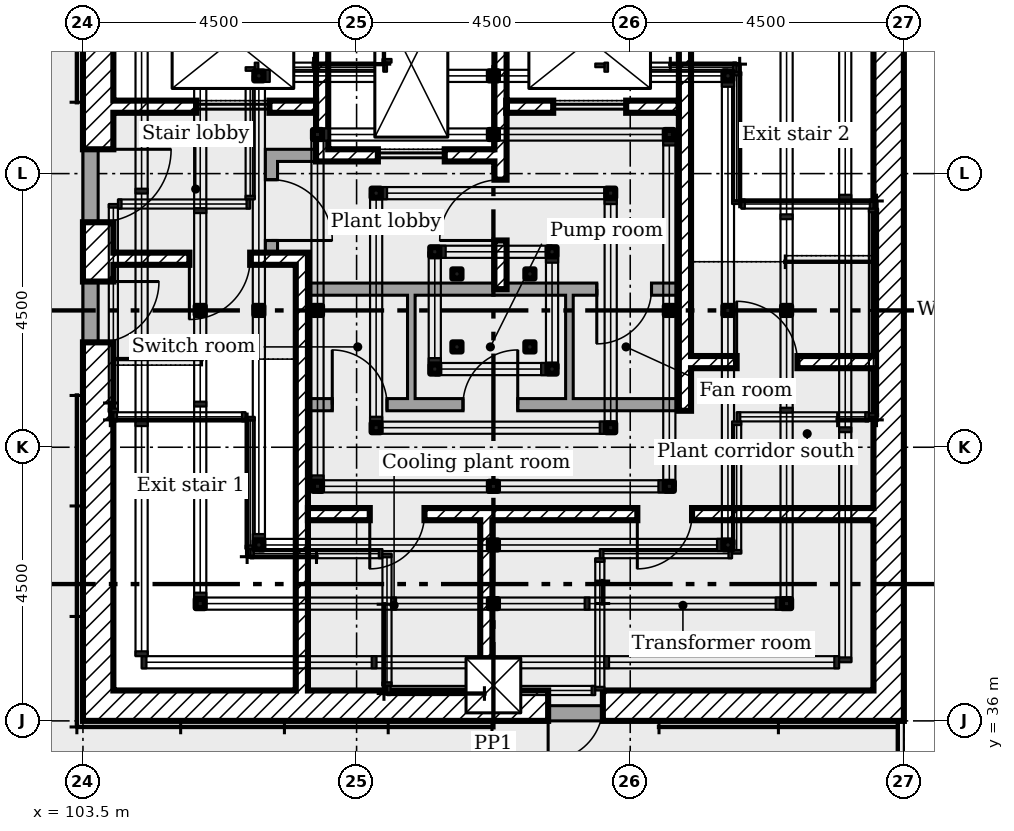
"""IFC4 building model, lengths in metres.
Left out: names, types, materials, properties, quantities, classifications, styles, units other than length and angle.
Written with IfcOpenShell. Run it as: python <this file> out.ifc"""

import sys

from ifc_helpers import new_model, si_unit, direction, frame, frame_2d, origin, origin_2d, place, context, subcontext, project, spatial, rectangle, hollow_rectangle, extrude, element, fill, save


model = new_model("IFC4")
c1 = context("Model", 3, precision=1e-05, world=origin(), true_north=direction((0.0, 1.0)))
c2 = subcontext(c1, "Body", "Model", "MODEL_VIEW")
j1 = project(units=[si_unit("LENGTHUNIT", "METRE"), si_unit("PLANEANGLEUNIT", "RADIAN")], contexts=[c1])
p1 = place(None, origin())
s1 = spatial("IfcSite", under=j1, at=p1, CompositionType="ELEMENT")
p2 = place(p1, origin())
s2 = spatial("IfcBuilding", under=s1, at=p2, CompositionType="ELEMENT")
p3 = place(p2, frame((0.0, 0.0, 210.0)))
s3 = spatial("IfcBuildingStorey", under=s2, at=p3, CompositionType="ELEMENT", Elevation=210.0)
p4 = place(p3, frame((103.5, 36.125, 3.6)))
e1 = element("IfcWall", 1, at=p4, inside=s3, PredefinedType="PARAPET", context=c2, shape_type="SweptSolid", body=[
    extrude(rectangle(XDim=13.5, YDim=0.25, at=frame_2d((6.75, 0.0))), origin(), (0.0, 0.0, 1.0), 1.1),
])
p5 = place(p3, frame((116.875, 36.25, 3.6), z_axis=(0.0, 0.0, 1.0), x_axis=(0.0, 1.0, 0.0)))
e2 = element("IfcWall", 2, at=p5, inside=s3, PredefinedType="PARAPET", context=c2, shape_type="SweptSolid", body=[
    extrude(rectangle(XDim=13.25, YDim=0.25, at=frame_2d((6.625, 0.0))), origin(), (0.0, 0.0, 1.0), 1.1),
])
p6 = place(p3, frame((103.625, 49.25, 3.6), z_axis=(0.0, 0.0, 1.0), x_axis=(0.0, -1.0, 0.0)))
e3 = element("IfcWall", 3, at=p6, inside=s3, PredefinedType="PARAPET", context=c2, shape_type="SweptSolid", body=[
    extrude(rectangle(XDim=13.0, YDim=0.25, at=frame_2d((6.5, 0.0))), origin(), (0.0, 0.0, 1.0), 1.1),
])
for number, where in (
    (4, (105.428, 37.928, 3.6)),
    (5, (110.25, 37.928, 3.6)),
    (6, (115.072, 37.928, 3.6)),
    (7, (115.072, 42.75, 3.6)),
    (8, (105.428, 42.75, 3.6)),
):
    element("IfcColumn", number, at=place(p3, frame(where)), inside=s3, PredefinedType="COLUMN", context=c2, shape_type="SweptSolid", body=[
        extrude(hollow_rectangle(XDim=0.15, YDim=0.15, WallThickness=0.008, at=origin_2d()), origin(), (0.0, 0.0, 1.0), 1.84),
    ])
for number, where in (
    (9, (106.393, 38.893, 3.6)),
    (10, (110.25, 38.893, 3.6)),
    (11, (114.107, 38.893, 3.6)),
    (12, (114.107, 42.75, 3.6)),
    (13, (114.107, 46.607, 3.6)),
    (14, (110.25, 46.607, 3.6)),
    (15, (106.393, 46.607, 3.6)),
    (16, (106.393, 42.75, 3.6)),
):
    element("IfcColumn", number, at=place(p3, frame(where)), inside=s3, PredefinedType="COLUMN", context=c2, shape_type="SweptSolid", body=[
        extrude(hollow_rectangle(XDim=0.15, YDim=0.15, WallThickness=0.008, at=origin_2d()), origin(), (0.0, 0.0, 1.0), 3.99),
    ])
for number, where in (
    (17, (107.357, 39.857, 3.6)),
    (18, (110.25, 39.857, 3.6)),
    (19, (113.143, 39.857, 3.6)),
    (20, (113.143, 42.75, 3.6)),
    (21, (113.143, 45.643, 3.6)),
    (22, (110.25, 45.643, 3.6)),
    (23, (107.357, 45.643, 3.6)),
    (24, (107.357, 42.75, 3.6)),
):
    element("IfcColumn", number, at=place(p3, frame(where)), inside=s3, PredefinedType="COLUMN", context=c2, shape_type="SweptSolid", body=[
        extrude(hollow_rectangle(XDim=0.15, YDim=0.15, WallThickness=0.008, at=origin_2d()), origin(), (0.0, 0.0, 1.0), 6.18),
    ])
for number, where in (
    (25, (108.322, 40.822, 3.6)),
    (26, (112.178, 40.822, 3.6)),
    (27, (112.178, 44.678, 3.6)),
    (28, (108.322, 44.678, 3.6)),
):
    element("IfcColumn", number, at=place(p3, frame(where)), inside=s3, PredefinedType="COLUMN", context=c2, shape_type="SweptSolid", body=[
        extrude(hollow_rectangle(XDim=0.15, YDim=0.15, WallThickness=0.008, at=origin_2d()), origin(), (0.0, 0.0, 1.0), 8.29),
    ])
for number, where in (
    (29, (109.286, 41.786, 3.6)),
    (30, (111.214, 41.786, 3.6)),
    (31, (111.214, 43.714, 3.6)),
    (32, (109.286, 43.714, 3.6)),
):
    element("IfcColumn", number, at=place(p3, frame(where)), inside=s3, PredefinedType="COLUMN", context=c2, shape_type="SweptSolid", body=[
        extrude(hollow_rectangle(XDim=0.15, YDim=0.15, WallThickness=0.008, at=origin_2d()), origin(), (0.0, 0.0, 1.0), 10.48),
    ])
for number, where in (
    (33, (109.65, 42.15, 3.6)),
    (34, (110.85, 42.15, 3.6)),
    (35, (110.85, 43.35, 3.6)),
    (36, (109.65, 43.35, 3.6)),
):
    element("IfcColumn", number, at=place(p3, frame(where)), inside=s3, PredefinedType="COLUMN", context=c2, shape_type="SweptSolid", body=[
        extrude(hollow_rectangle(XDim=0.15, YDim=0.15, WallThickness=0.008, at=origin_2d()), origin(), (0.0, 0.0, 1.0), 12.63),
    ])
p7 = place(p3, frame((116.75, 36.0, 0.0), z_axis=(0.0, 0.0, 1.0), x_axis=(0.0, 1.0, 0.0)))
e37 = element("IfcWall", 37, at=p7, inside=s3, PredefinedType="SHEAR", context=c2, shape_type="SweptSolid", body=[
    extrude(rectangle(XDim=13.5, YDim=0.5, at=frame_2d((6.75, 0.0))), origin(), (0.0, 0.0, 1.0), 3.2),
])
p8 = place(p3, frame((103.5, 36.25, 0.0)))
e38 = element("IfcWall", 38, at=p8, inside=s3, PredefinedType="SHEAR", context=c2, shape_type="SweptSolid", body=[
    extrude(rectangle(XDim=13.0, YDim=0.5, at=frame_2d((6.5, 0.0))), origin(), (0.0, 0.0, 1.0), 3.2),
])
p9 = place(p8, frame((7.65, 0.0, 0.0)))
e39 = element("IfcOpeningElement", 39, at=p9, cuts=e38, PredefinedType="OPENING", context=c2, shape_type="SweptSolid", body=[
    extrude(rectangle(XDim=0.9, YDim=2.1, at=frame_2d((0.45, 1.05))), frame((0.0, 0.26, 0.0), z_axis=(0.0, -1.0, 0.0), x_axis=(1.0, 0.0, 0.0)), (0.0, 0.0, 1.0), 0.52),
])
p10 = place(p3, frame((103.75, 36.5, 0.0), z_axis=(0.0, 0.0, 1.0), x_axis=(0.0, 1.0, 0.0)))
e40 = element("IfcWall", 40, at=p10, inside=s3, PredefinedType="SHEAR", context=c2, shape_type="SweptSolid", body=[
    extrude(rectangle(XDim=12.5, YDim=0.5, at=frame_2d((6.25, 0.0))), origin(), (0.0, 0.0, 1.0), 3.2),
])
p11 = place(p10, frame((7.7, 0.0, 0.0)))
e41 = element("IfcOpeningElement", 41, at=p11, cuts=e40, PredefinedType="OPENING", context=c2, shape_type="SweptSolid", body=[
    extrude(rectangle(XDim=1.2, YDim=2.1, at=frame_2d((0.6, 1.05))), frame((0.0, 0.26, 0.0), z_axis=(0.0, -1.0, 0.0), x_axis=(1.0, 0.0, 0.0)), (0.0, 0.0, 1.0), 0.52),
])
p12 = place(p10, frame((5.725, 0.0, 0.0)))
e42 = element("IfcOpeningElement", 42, at=p12, cuts=e40, PredefinedType="OPENING", context=c2, shape_type="SweptSolid", body=[
    extrude(rectangle(XDim=1.0, YDim=2.1, at=frame_2d((0.5, 1.05))), frame((0.0, 0.26, 0.0), z_axis=(0.0, -1.0, 0.0), x_axis=(1.0, 0.0, 0.0)), (0.0, 0.0, 1.0), 0.52),
])
p13 = place(p3, frame((107.433, 49.0, 0.0), z_axis=(0.0, 0.0, 1.0), x_axis=(0.0, -1.0, 0.0)))
e43 = element("IfcWall", 43, at=p13, inside=s3, PredefinedType="SHEAR", context=c2, shape_type="SweptSolid", body=[
    extrude(rectangle(XDim=3.8, YDim=0.2, at=frame_2d((1.9, 0.0))), origin(), (0.0, 0.0, 1.0), 3.2),
])
p14 = place(p3, frame((110.367, 49.0, 0.0), z_axis=(0.0, 0.0, 1.0), x_axis=(0.0, -1.0, 0.0)))
e44 = element("IfcWall", 44, at=p14, inside=s3, PredefinedType="SHEAR", context=c2, shape_type="SweptSolid", body=[
    extrude(rectangle(XDim=5.9, YDim=0.2, at=frame_2d((2.95, 0.0))), origin(), (0.0, 0.0, 1.0), 3.2),
])
p15 = place(p14, frame((4.1, 0.0, 0.0)))
e45 = element("IfcOpeningElement", 45, at=p15, cuts=e44, PredefinedType="OPENING", context=c2, shape_type="SweptSolid", body=[
    extrude(rectangle(XDim=1.0, YDim=2.1, at=frame_2d((0.5, 1.05))), frame((0.0, 0.11, 0.0), z_axis=(0.0, -1.0, 0.0), x_axis=(1.0, 0.0, 0.0)), (0.0, 0.0, 1.0), 0.22),
])
p16 = place(p3, frame((110.133, 36.5, 0.0), z_axis=(0.0, 0.0, 1.0), x_axis=(0.0, 1.0, 0.0)))
e46 = element("IfcWall", 46, at=p16, inside=s3, PredefinedType="SHEAR", context=c2, shape_type="SweptSolid", body=[
    extrude(rectangle(XDim=2.8, YDim=0.2, at=frame_2d((1.4, 0.0))), origin(), (0.0, 0.0, 1.0), 3.2),
])
p17 = place(p3, frame((106.5, 45.3, 0.0)))
e47 = element("IfcWall", 47, at=p17, inside=s3, PredefinedType="PARTITIONING", context=c2, shape_type="SweptSolid", body=[
    extrude(rectangle(XDim=0.833, YDim=0.2, at=frame_2d((0.417, 0.0))), origin(), (0.0, 0.0, 1.0), 3.2),
])
p18 = place(p3, frame((106.6, 43.7, 0.0), z_axis=(0.0, 0.0, 1.0), x_axis=(0.0, 1.0, 0.0)))
e48 = element("IfcWall", 48, at=p18, inside=s3, PredefinedType="PARTITIONING", context=c2, shape_type="SweptSolid", body=[
    extrude(rectangle(XDim=1.5, YDim=0.2, at=frame_2d((0.75, 0.0))), origin(), (0.0, 0.0, 1.0), 3.2),
])
p19 = place(p18, frame((0.2, 0.0, 0.0)))
e49 = element("IfcOpeningElement", 49, at=p19, cuts=e48, PredefinedType="OPENING", context=c2, shape_type="SweptSolid", body=[
    extrude(rectangle(XDim=1.0, YDim=2.1, at=frame_2d((0.5, 1.05))), frame((0.0, 0.11, 0.0), z_axis=(0.0, -1.0, 0.0), x_axis=(1.0, 0.0, 0.0)), (0.0, 0.0, 1.0), 0.22),
])
p20 = place(p3, frame((104.0, 46.1, 0.0)))
e50 = element("IfcWall", 50, at=p20, inside=s3, PredefinedType="SHEAR", context=c2, shape_type="SweptSolid", body=[
    extrude(rectangle(XDim=3.333, YDim=0.2, at=frame_2d((1.667, 0.0))), origin(), (0.0, 0.0, 1.0), 3.2),
])
p21 = place(p20, frame((1.367, 0.0, 0.0)))
e51 = element("IfcOpeningElement", 51, at=p21, cuts=e50, PredefinedType="OPENING", context=c2, shape_type="SweptSolid", body=[
    extrude(rectangle(XDim=1.2, YDim=2.1, at=frame_2d((0.6, 1.05))), frame((0.0, 0.11, 0.0), z_axis=(0.0, -1.0, 0.0), x_axis=(1.0, 0.0, 0.0)), (0.0, 0.0, 1.0), 0.22),
])
p22 = place(p3, frame((110.467, 46.1, 0.0)))
e52 = element("IfcWall", 52, at=p22, inside=s3, PredefinedType="SHEAR", context=c2, shape_type="SweptSolid", body=[
    extrude(rectangle(XDim=2.833, YDim=0.2, at=frame_2d((1.417, 0.0))), origin(), (0.0, 0.0, 1.0), 3.2),
])
p23 = place(p22, frame((0.767, 0.0, 0.0)))
e53 = element("IfcOpeningElement", 53, at=p23, cuts=e52, PredefinedType="OPENING", context=c2, shape_type="SweptSolid", body=[
    extrude(rectangle(XDim=1.2, YDim=2.1, at=frame_2d((0.6, 1.05))), frame((0.0, 0.11, 0.0), z_axis=(0.0, -1.0, 0.0), x_axis=(1.0, 0.0, 0.0)), (0.0, 0.0, 1.0), 0.22),
])
p24 = place(p3, frame((107.533, 45.3, 0.0)))
e54 = element("IfcWall", 54, at=p24, inside=s3, PredefinedType="SHEAR", context=c2, shape_type="SweptSolid", body=[
    extrude(rectangle(XDim=2.733, YDim=0.2, at=frame_2d((1.367, 0.0))), origin(), (0.0, 0.0, 1.0), 3.2),
])
p25 = place(p24, frame((0.817, 0.0, 0.0)))
e55 = element("IfcOpeningElement", 55, at=p25, cuts=e54, PredefinedType="OPENING", context=c2, shape_type="SweptSolid", body=[
    extrude(rectangle(XDim=1.1, YDim=2.1, at=frame_2d((0.55, 1.05))), frame((0.0, 0.11, 0.0), z_axis=(0.0, -1.0, 0.0), x_axis=(1.0, 0.0, 0.0)), (0.0, 0.0, 1.0), 0.22),
])
p26 = place(p3, frame((107.2, 39.4, 0.0)))
e56 = element("IfcWall", 56, at=p26, inside=s3, PredefinedType="SHEAR", context=c2, shape_type="SweptSolid", body=[
    extrude(rectangle(XDim=9.3, YDim=0.2, at=frame_2d((4.65, 0.0))), origin(), (0.0, 0.0, 1.0), 3.2),
])
p27 = place(p26, frame((1.017, 0.0, 0.0)))
e57 = element("IfcOpeningElement", 57, at=p27, cuts=e56, PredefinedType="OPENING", context=c2, shape_type="SweptSolid", body=[
    extrude(rectangle(XDim=0.9, YDim=2.1, at=frame_2d((0.45, 1.05))), frame((0.0, 0.11, 0.0), z_axis=(0.0, -1.0, 0.0), x_axis=(1.0, 0.0, 0.0)), (0.0, 0.0, 1.0), 0.22),
])
p28 = place(p26, frame((5.417, 0.0, 0.0)))
e58 = element("IfcOpeningElement", 58, at=p28, cuts=e56, PredefinedType="OPENING", context=c2, shape_type="SweptSolid", body=[
    extrude(rectangle(XDim=0.9, YDim=2.1, at=frame_2d((0.45, 1.05))), frame((0.0, 0.11, 0.0), z_axis=(0.0, -1.0, 0.0), x_axis=(1.0, 0.0, 0.0)), (0.0, 0.0, 1.0), 0.22),
])
p29 = place(p3, frame((107.1, 36.5, 0.0), z_axis=(0.0, 0.0, 1.0), x_axis=(0.0, 1.0, 0.0)))
e59 = element("IfcWall", 59, at=p29, inside=s3, PredefinedType="SHEAR", context=c2, shape_type="SweptSolid", body=[
    extrude(rectangle(XDim=7.2, YDim=0.2, at=frame_2d((3.6, 0.0))), origin(), (0.0, 0.0, 1.0), 3.2),
])
p30 = place(p3, frame((104.0, 43.6, 0.0)))
e60 = element("IfcWall", 60, at=p30, inside=s3, PredefinedType="SHEAR", context=c2, shape_type="SweptSolid", body=[
    extrude(rectangle(XDim=3.0, YDim=0.2, at=frame_2d((1.5, 0.0))), origin(), (0.0, 0.0, 1.0), 3.2),
])
p31 = place(p30, frame((1.25, 0.0, 0.0)))
e61 = element("IfcOpeningElement", 61, at=p31, cuts=e60, PredefinedType="OPENING", context=c2, shape_type="SweptSolid", body=[
    extrude(rectangle(XDim=1.0, YDim=2.1, at=frame_2d((0.5, 1.05))), frame((0.0, 0.11, 0.0), z_axis=(0.0, -1.0, 0.0), x_axis=(1.0, 0.0, 0.0)), (0.0, 0.0, 1.0), 0.22),
])
p32 = place(p3, frame((113.5, 41.9, 0.0)))
e62 = element("IfcWall", 62, at=p32, inside=s3, PredefinedType="SHEAR", context=c2, shape_type="SweptSolid", body=[
    extrude(rectangle(XDim=3.0, YDim=0.2, at=frame_2d((1.5, 0.0))), origin(), (0.0, 0.0, 1.0), 3.2),
])
p33 = place(p32, frame((0.75, 0.0, 0.0)))
e63 = element("IfcOpeningElement", 63, at=p33, cuts=e62, PredefinedType="OPENING", context=c2, shape_type="SweptSolid", body=[
    extrude(rectangle(XDim=1.0, YDim=2.1, at=frame_2d((0.5, 1.05))), frame((0.0, 0.11, 0.0), z_axis=(0.0, -1.0, 0.0), x_axis=(1.0, 0.0, 0.0)), (0.0, 0.0, 1.0), 0.22),
])
p34 = place(p3, frame((113.4, 41.1, 0.0), z_axis=(0.0, 0.0, 1.0), x_axis=(0.0, 1.0, 0.0)))
e64 = element("IfcWall", 64, at=p34, inside=s3, PredefinedType="SHEAR", context=c2, shape_type="SweptSolid", body=[
    extrude(rectangle(XDim=7.9, YDim=0.2, at=frame_2d((3.95, 0.0))), origin(), (0.0, 0.0, 1.0), 3.2),
])
p35 = place(p3, frame((107.2, 43.1, 0.0)))
e65 = element("IfcWall", 65, at=p35, inside=s3, PredefinedType="PARTITIONING", context=c2, shape_type="SweptSolid", body=[
    extrude(rectangle(XDim=6.1, YDim=0.2, at=frame_2d((3.05, 0.0))), origin(), (0.0, 0.0, 1.0), 3.2),
])
p36 = place(p35, frame((4.75, 0.0, 0.0)))
e66 = element("IfcOpeningElement", 66, at=p36, cuts=e65, PredefinedType="OPENING", context=c2, shape_type="SweptSolid", body=[
    extrude(rectangle(XDim=0.9, YDim=2.1, at=frame_2d((0.45, 1.05))), frame((0.0, 0.11, 0.0), z_axis=(0.0, -1.0, 0.0), x_axis=(1.0, 0.0, 0.0)), (0.0, 0.0, 1.0), 0.22),
])
p37 = place(p3, frame((107.2, 41.2, 0.0)))
e67 = element("IfcWall", 67, at=p37, inside=s3, PredefinedType="PARTITIONING", context=c2, shape_type="SweptSolid", body=[
    extrude(rectangle(XDim=6.1, YDim=0.2, at=frame_2d((3.05, 0.0))), origin(), (0.0, 0.0, 1.0), 3.2),
])
p38 = place(p37, frame((0.4, 0.0, 0.0)))
e68 = element("IfcOpeningElement", 68, at=p38, cuts=e67, PredefinedType="OPENING", context=c2, shape_type="SweptSolid", body=[
    extrude(rectangle(XDim=0.9, YDim=2.1, at=frame_2d((0.45, 1.05))), frame((0.0, 0.11, 0.0), z_axis=(0.0, -1.0, 0.0), x_axis=(1.0, 0.0, 0.0)), (0.0, 0.0, 1.0), 0.22),
])
p39 = place(p37, frame((2.55, 0.0, 0.0)))
e69 = element("IfcOpeningElement", 69, at=p39, cuts=e67, PredefinedType="OPENING", context=c2, shape_type="SweptSolid", body=[
    extrude(rectangle(XDim=0.9, YDim=2.1, at=frame_2d((0.45, 1.05))), frame((0.0, 0.11, 0.0), z_axis=(0.0, -1.0, 0.0), x_axis=(1.0, 0.0, 0.0)), (0.0, 0.0, 1.0), 0.22),
])
for number, where, z_axis, x_axis in (
    (70, (108.9, 41.3, 0.0), (0.0, 0.0, 1.0), (0.0, 1.0, 0.0)),
    (71, (111.5, 41.3, 0.0), (0.0, 0.0, 1.0), (0.0, 1.0, 0.0)),
):
    element("IfcWall", number, at=place(p3, frame(where, z_axis=z_axis, x_axis=x_axis)), inside=s3, PredefinedType="PARTITIONING", context=c2, shape_type="SweptSolid", body=[
        extrude(rectangle(XDim=1.7, YDim=0.125, at=frame_2d((0.85, 0.0))), origin(), (0.0, 0.0, 1.0), 3.2),
    ])
p40 = place(p3, frame((0.0, 0.0, 3.2)))
p41 = place(p40, frame((110.25, 36.582, -0.01)))
p42 = place(p41, frame((0.0, 0.0, 0.36)))
e72 = element("IfcDoor", 72, at=p42, inside=s3, OperationType="SINGLE_SWING_LEFT", PredefinedType="TRAPDOOR", context=c2, shape_type="SweptSolid", body=[
    extrude(rectangle(XDim=0.9, YDim=0.9, at=origin_2d()), origin(), (0.0, 0.0, 1.0), 0.05),
])
p43 = place(p9, frame((0.9, 0.0, 0.0), x_axis=(-1.0, 0.0, 0.0)))
e73 = element("IfcDoor", 73, at=p43, inside=s3, OperationType="SINGLE_SWING_LEFT", PredefinedType="DOOR", context=c2, shape_type="SweptSolid", body=[
    extrude(rectangle(XDim=0.9, YDim=2.1, at=frame_2d((0.45, 1.05))), frame((0.0, 0.025, 0.0), z_axis=(0.0, -1.0, 0.0), x_axis=(1.0, 0.0, 0.0)), (0.0, 0.0, 1.0), 0.05),
])
fill(e39, e73)
p44 = place(p11, frame((1.2, 0.0, 0.0), x_axis=(-1.0, 0.0, 0.0)))
e74 = element("IfcDoor", 74, at=p44, inside=s3, OperationType="SINGLE_SWING_RIGHT", PredefinedType="DOOR", context=c2, shape_type="SweptSolid", body=[
    extrude(rectangle(XDim=1.2, YDim=2.1, at=frame_2d((0.6, 1.05))), frame((0.0, 0.025, 0.0), z_axis=(0.0, -1.0, 0.0), x_axis=(1.0, 0.0, 0.0)), (0.0, 0.0, 1.0), 0.05),
])
fill(e41, e74)
p45 = place(p31, frame((1.0, 0.0, 0.0), x_axis=(-1.0, 0.0, 0.0)))
e75 = element("IfcDoor", 75, at=p45, inside=s3, OperationType="SINGLE_SWING_LEFT", PredefinedType="DOOR", context=c2, shape_type="SweptSolid", body=[
    extrude(rectangle(XDim=1.0, YDim=2.1, at=frame_2d((0.5, 1.05))), frame((0.0, 0.025, 0.0), z_axis=(0.0, -1.0, 0.0), x_axis=(1.0, 0.0, 0.0)), (0.0, 0.0, 1.0), 0.05),
])
fill(e61, e75)
p46 = place(p12, frame((1.0, 0.0, 0.0), x_axis=(-1.0, 0.0, 0.0)))
e76 = element("IfcDoor", 76, at=p46, inside=s3, OperationType="SINGLE_SWING_RIGHT", PredefinedType="DOOR", context=c2, shape_type="SweptSolid", body=[
    extrude(rectangle(XDim=1.0, YDim=2.1, at=frame_2d((0.5, 1.05))), frame((0.0, 0.025, 0.0), z_axis=(0.0, -1.0, 0.0), x_axis=(1.0, 0.0, 0.0)), (0.0, 0.0, 1.0), 0.05),
])
fill(e42, e76)
p47 = place(p33, origin())
e77 = element("IfcDoor", 77, at=p47, inside=s3, OperationType="SINGLE_SWING_RIGHT", PredefinedType="DOOR", context=c2, shape_type="SweptSolid", body=[
    extrude(rectangle(XDim=1.0, YDim=2.1, at=frame_2d((0.5, 1.05))), frame((0.0, 0.025, 0.0), z_axis=(0.0, -1.0, 0.0), x_axis=(1.0, 0.0, 0.0)), (0.0, 0.0, 1.0), 0.05),
])
fill(e63, e77)
p48 = place(p15, frame((1.0, 0.0, 0.0), x_axis=(-1.0, 0.0, 0.0)))
e78 = element("IfcDoor", 78, at=p48, inside=s3, OperationType="SINGLE_SWING_RIGHT", PredefinedType="DOOR", context=c2, shape_type="SweptSolid", body=[
    extrude(rectangle(XDim=1.0, YDim=2.1, at=frame_2d((0.5, 1.05))), frame((0.0, 0.025, 0.0), z_axis=(0.0, -1.0, 0.0), x_axis=(1.0, 0.0, 0.0)), (0.0, 0.0, 1.0), 0.05),
])
fill(e45, e78)
p49 = place(p19, frame((1.0, 0.0, 0.0), x_axis=(-1.0, 0.0, 0.0)))
e79 = element("IfcDoor", 79, at=p49, inside=s3, OperationType="SINGLE_SWING_LEFT", PredefinedType="DOOR", context=c2, shape_type="SweptSolid", body=[
    extrude(rectangle(XDim=1.0, YDim=2.1, at=frame_2d((0.5, 1.05))), frame((0.0, 0.025, 0.0), z_axis=(0.0, -1.0, 0.0), x_axis=(1.0, 0.0, 0.0)), (0.0, 0.0, 1.0), 0.05),
])
fill(e49, e79)
p50 = place(p27, frame((0.9, 0.0, 0.0), x_axis=(-1.0, 0.0, 0.0)))
e80 = element("IfcDoor", 80, at=p50, inside=s3, OperationType="SINGLE_SWING_LEFT", PredefinedType="DOOR", context=c2, shape_type="SweptSolid", body=[
    extrude(rectangle(XDim=0.9, YDim=2.1, at=frame_2d((0.45, 1.05))), frame((0.0, 0.025, 0.0), z_axis=(0.0, -1.0, 0.0), x_axis=(1.0, 0.0, 0.0)), (0.0, 0.0, 1.0), 0.05),
])
fill(e57, e80)
p51 = place(p28, frame((0.9, 0.0, 0.0), x_axis=(-1.0, 0.0, 0.0)))
e81 = element("IfcDoor", 81, at=p51, inside=s3, OperationType="SINGLE_SWING_LEFT", PredefinedType="DOOR", context=c2, shape_type="SweptSolid", body=[
    extrude(rectangle(XDim=0.9, YDim=2.1, at=frame_2d((0.45, 1.05))), frame((0.0, 0.025, 0.0), z_axis=(0.0, -1.0, 0.0), x_axis=(1.0, 0.0, 0.0)), (0.0, 0.0, 1.0), 0.05),
])
fill(e58, e81)
p52 = place(p38, origin())
e82 = element("IfcDoor", 82, at=p52, inside=s3, OperationType="SINGLE_SWING_RIGHT", PredefinedType="DOOR", context=c2, shape_type="SweptSolid", body=[
    extrude(rectangle(XDim=0.9, YDim=2.1, at=frame_2d((0.45, 1.05))), frame((0.0, 0.025, 0.0), z_axis=(0.0, -1.0, 0.0), x_axis=(1.0, 0.0, 0.0)), (0.0, 0.0, 1.0), 0.05),
])
fill(e68, e82)
p53 = place(p39, origin())
e83 = element("IfcDoor", 83, at=p53, inside=s3, OperationType="SINGLE_SWING_LEFT", PredefinedType="DOOR", context=c2, shape_type="SweptSolid", body=[
    extrude(rectangle(XDim=0.9, YDim=2.1, at=frame_2d((0.45, 1.05))), frame((0.0, 0.025, 0.0), z_axis=(0.0, -1.0, 0.0), x_axis=(1.0, 0.0, 0.0)), (0.0, 0.0, 1.0), 0.05),
])
fill(e69, e83)
p54 = place(p36, frame((0.9, 0.0, 0.0), x_axis=(-1.0, 0.0, 0.0)))
e84 = element("IfcDoor", 84, at=p54, inside=s3, OperationType="SINGLE_SWING_LEFT", PredefinedType="DOOR", context=c2, shape_type="SweptSolid", body=[
    extrude(rectangle(XDim=0.9, YDim=2.1, at=frame_2d((0.45, 1.05))), frame((0.0, 0.025, 0.0), z_axis=(0.0, -1.0, 0.0), x_axis=(1.0, 0.0, 0.0)), (0.0, 0.0, 1.0), 0.05),
])
fill(e66, e84)
p55 = place(p25, origin())
e85 = element("IfcDoor", 85, at=p55, inside=s3, OperationType="SLIDING_TO_LEFT", PredefinedType="DOOR", context=c2, shape_type="SweptSolid", body=[
    extrude(rectangle(XDim=1.1, YDim=2.1, at=frame_2d((0.55, 1.05))), frame((0.0, 0.025, 0.0), z_axis=(0.0, -1.0, 0.0), x_axis=(1.0, 0.0, 0.0)), (0.0, 0.0, 1.0), 0.05),
])
fill(e55, e85)
p56 = place(p21, origin())
e86 = element("IfcDoor", 86, at=p56, inside=s3, OperationType="SLIDING_TO_LEFT", PredefinedType="DOOR", context=c2, shape_type="SweptSolid", body=[
    extrude(rectangle(XDim=1.2, YDim=2.1, at=frame_2d((0.6, 1.05))), frame((0.0, 0.025, 0.0), z_axis=(0.0, -1.0, 0.0), x_axis=(1.0, 0.0, 0.0)), (0.0, 0.0, 1.0), 0.05),
])
fill(e51, e86)
p57 = place(p23, origin())
e87 = element("IfcDoor", 87, at=p57, inside=s3, OperationType="SLIDING_TO_LEFT", PredefinedType="DOOR", context=c2, shape_type="SweptSolid", body=[
    extrude(rectangle(XDim=1.2, YDim=2.1, at=frame_2d((0.6, 1.05))), frame((0.0, 0.025, 0.0), z_axis=(0.0, -1.0, 0.0), x_axis=(1.0, 0.0, 0.0)), (0.0, 0.0, 1.0), 0.05),
])
fill(e53, e87)
save(model, sys.argv[1])
